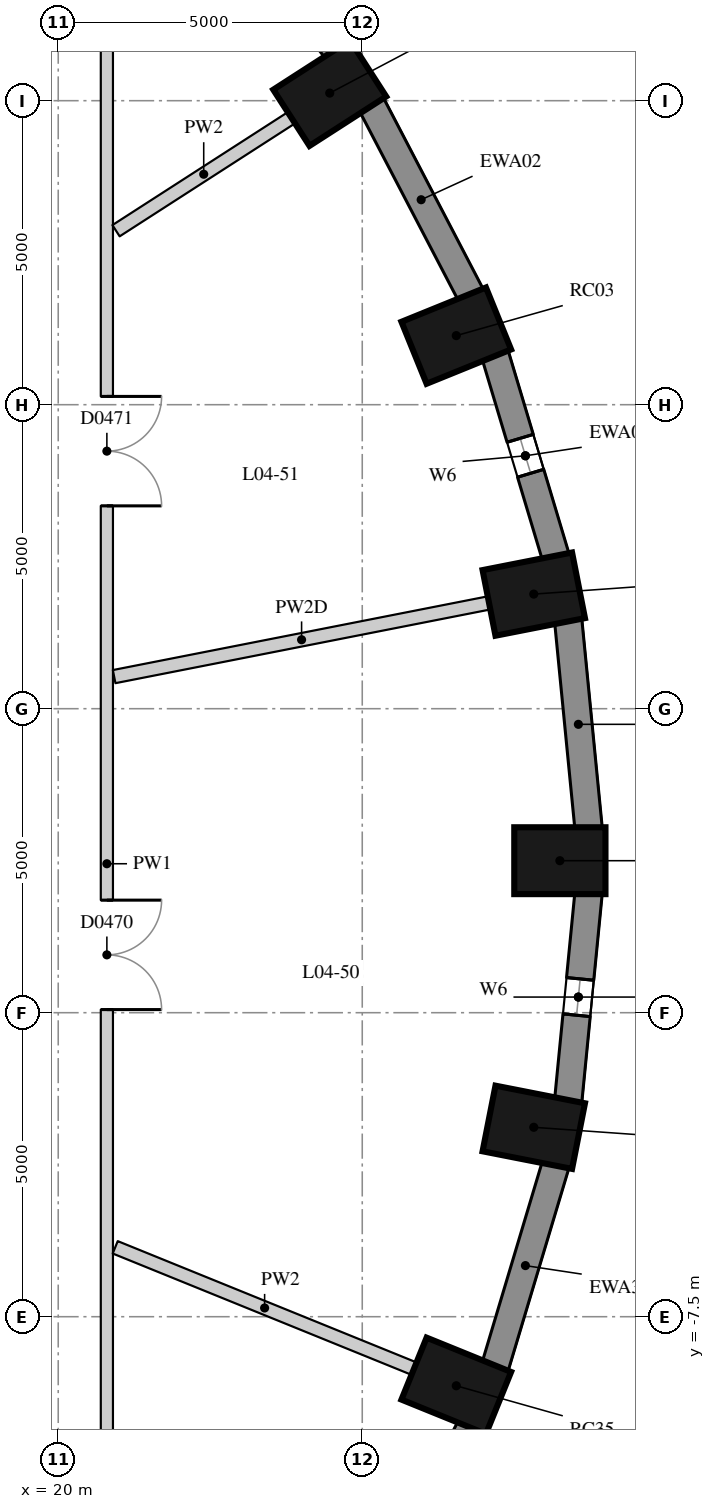
"""IFC4 building model, lengths in metres.
Left out: names, types, materials, properties, quantities, classifications, styles, units other than length and angle.
Written with IfcOpenShell. Run it as: python <this file> out.ifc"""

import sys

from ifc_helpers import new_model, si_unit, direction, frame, frame_2d, origin, origin_2d, place, context, subcontext, project, spatial, rectangle, extrude, element, fill, save


model = new_model("IFC4")
c1 = context("Model", 3, precision=1e-05, world=origin(), true_north=direction((0.0, 1.0)))
c2 = subcontext(c1, "Body", "Model", "MODEL_VIEW")
j1 = project(units=[si_unit("LENGTHUNIT", "METRE"), si_unit("PLANEANGLEUNIT", "RADIAN")], contexts=[c1])
p1 = place(None, origin())
s1 = spatial("IfcSite", under=j1, at=p1, CompositionType="ELEMENT")
p2 = place(p1, origin())
s2 = spatial("IfcBuilding", under=s1, at=p2, CompositionType="ELEMENT")
p3 = place(p2, frame((0.0, 0.0, 21.7)))
s3 = spatial("IfcBuildingStorey", under=s2, at=p3, CompositionType="ELEMENT", Elevation=21.7)
for number, where, z_axis, x_axis in (
    (1, (28.25, 0.0, 0.0), (0.0, 0.0, 1.0), (1.0, 0.0, 0.0)),
    (2, (27.821, 4.385, 0.0), (0.0, 0.0, 1.0), (0.981, 0.193, 0.0)),
    (3, (26.546, 8.636, 0.0), (0.0, 0.0, 1.0), (0.927, 0.376, 0.0)),
    (4, (24.465, 12.625, 0.0), (0.0, 0.0, 1.0), (0.841, 0.541, 0.0)),
    (5, (26.546, -8.636, 0.0), (0.0, 0.0, 1.0), (0.927, -0.376, 0.0)),
    (6, (27.821, -4.385, 0.0), (0.0, 0.0, 1.0), (0.981, -0.193, 0.0)),
):
    element("IfcColumn", number, at=place(p3, frame(where, z_axis=z_axis, x_axis=x_axis)), inside=s3, PredefinedType="COLUMN", context=c2, shape_type="SweptSolid", body=[
        extrude(rectangle(XDim=1.5, YDim=1.1, at=origin_2d()), origin(), (0.0, 0.0, 1.0), 3.3),
    ])
p4 = place(p3, frame((28.722, 0.53, 0.0), z_axis=(0.0, 0.0, 1.0), x_axis=(-0.097389581596, 0.995246336038, 0.0)))
e7 = element("IfcWall", 7, at=p4, inside=s3, PredefinedType="SOLIDWALL", context=c2, shape_type="SweptSolid", body=[
    extrude(rectangle(XDim=3.442, YDim=0.45, at=frame_2d((1.721, 0.0))), origin(), (0.0, 0.0, 1.0), 3.02),
])
p5 = place(p3, frame((28.182, 4.996, 0.0), z_axis=(0.0, 0.0, 1.0), x_axis=(-0.287064133733, 0.957911364963, 0.0)))
e8 = element("IfcWall", 8, at=p5, inside=s3, PredefinedType="SOLIDWALL", context=c2, shape_type="SweptSolid", body=[
    extrude(rectangle(XDim=3.473, YDim=0.45, at=frame_2d((1.737, 0.0))), origin(), (0.0, 0.0, 1.0), 3.02),
])
p6 = place(p5, frame((1.437, 0.0, 0.4)))
e9 = element("IfcOpeningElement", 9, at=p6, cuts=e8, PredefinedType="OPENING", context=c2, shape_type="SweptSolid", body=[
    extrude(rectangle(XDim=0.6, YDim=1.75, at=frame_2d((0.3, 0.875))), frame((0.0, 0.235, 0.0), z_axis=(0.0, -1.0, 0.0), x_axis=(1.0, 0.0, 0.0)), (0.0, 0.0, 1.0), 0.47),
])
p7 = place(p3, frame((26.786, 9.305, 0.0), z_axis=(0.0, 0.0, 1.0), x_axis=(-0.462492775226, 0.886623050041, 0.0)))
e10 = element("IfcWall", 10, at=p7, inside=s3, PredefinedType="SOLIDWALL", context=c2, shape_type="SweptSolid", body=[
    extrude(rectangle(XDim=3.532, YDim=0.45, at=frame_2d((1.766, 0.0))), origin(), (0.0, 0.0, 1.0), 3.02),
])
p8 = place(p3, frame((24.578, 13.328, 0.0), z_axis=(0.0, 0.0, 1.0), x_axis=(-0.616661975264, 0.787228053529, 0.0)))
e11 = element("IfcWall", 11, at=p8, inside=s3, PredefinedType="SOLIDWALL", context=c2, shape_type="SweptSolid", body=[
    extrude(rectangle(XDim=3.61, YDim=0.45, at=frame_2d((1.805, 0.0))), origin(), (0.0, 0.0, 1.0), 3.02),
])
p9 = place(p8, frame((1.505, 0.0, 0.4)))
e12 = element("IfcOpeningElement", 12, at=p9, cuts=e11, PredefinedType="OPENING", context=c2, shape_type="SweptSolid", body=[
    extrude(rectangle(XDim=0.6, YDim=1.75, at=frame_2d((0.3, 0.875))), frame((0.0, 0.235, 0.0), z_axis=(0.0, -1.0, 0.0), x_axis=(1.0, 0.0, 0.0)), (0.0, 0.0, 1.0), 0.47),
])
p10 = place(p3, frame((25.152, -12.437, 0.0), z_axis=(0.0, 0.0, 1.0), x_axis=(0.462492775226, 0.886623050041, 0.0)))
e13 = element("IfcWall", 13, at=p10, inside=s3, PredefinedType="SOLIDWALL", context=c2, shape_type="SweptSolid", body=[
    extrude(rectangle(XDim=3.532, YDim=0.45, at=frame_2d((1.766, 0.0))), origin(), (0.0, 0.0, 1.0), 3.02),
])
p11 = place(p10, frame((1.466, 0.0, 0.4)))
e14 = element("IfcOpeningElement", 14, at=p11, cuts=e13, PredefinedType="OPENING", context=c2, shape_type="SweptSolid", body=[
    extrude(rectangle(XDim=0.6, YDim=1.75, at=frame_2d((0.3, 0.875))), frame((0.0, 0.235, 0.0), z_axis=(0.0, -1.0, 0.0), x_axis=(1.0, 0.0, 0.0)), (0.0, 0.0, 1.0), 0.47),
])
p12 = place(p3, frame((27.185, -8.323, 0.0), z_axis=(0.0, 0.0, 1.0), x_axis=(0.287064133733, 0.957911364963, 0.0)))
e15 = element("IfcWall", 15, at=p12, inside=s3, PredefinedType="SOLIDWALL", context=c2, shape_type="SweptSolid", body=[
    extrude(rectangle(XDim=3.473, YDim=0.45, at=frame_2d((1.737, 0.0))), origin(), (0.0, 0.0, 1.0), 3.02),
])
p13 = place(p3, frame((28.387, -3.956, 0.0), z_axis=(0.0, 0.0, 1.0), x_axis=(0.097389581596, 0.995246336038, 0.0)))
e16 = element("IfcWall", 16, at=p13, inside=s3, PredefinedType="SOLIDWALL", context=c2, shape_type="SweptSolid", body=[
    extrude(rectangle(XDim=3.442, YDim=0.45, at=frame_2d((1.721, 0.0))), origin(), (0.0, 0.0, 1.0), 3.02),
])
p14 = place(p13, frame((1.421, 0.0, 0.4)))
e17 = element("IfcOpeningElement", 17, at=p14, cuts=e16, PredefinedType="OPENING", context=c2, shape_type="SweptSolid", body=[
    extrude(rectangle(XDim=0.6, YDim=1.75, at=frame_2d((0.3, 0.875))), frame((0.0, 0.235, 0.0), z_axis=(0.0, -1.0, 0.0), x_axis=(1.0, 0.0, 0.0)), (0.0, 0.0, 1.0), 0.47),
])
p15 = place(p3, frame((20.8, 13.5, 0.0), z_axis=(0.0, 0.0, 1.0), x_axis=(0.0, -1.0, 0.0)))
e18 = element("IfcWall", 18, at=p15, inside=s3, PredefinedType="PARTITIONING", context=c2, shape_type="SweptSolid", body=[
    extrude(rectangle(XDim=27.1, YDim=0.2, at=frame_2d((13.55, 0.0))), origin(), (0.0, 0.0, 1.0), 3.02),
])
p16 = place(p15, frame((14.149, 0.0, 0.0)))
e19 = element("IfcOpeningElement", 19, at=p16, cuts=e18, PredefinedType="OPENING", context=c2, shape_type="SweptSolid", body=[
    extrude(rectangle(XDim=1.8, YDim=2.1, at=frame_2d((0.9, 1.05))), frame((0.0, 0.11, 0.0), z_axis=(0.0, -1.0, 0.0), x_axis=(1.0, 0.0, 0.0)), (0.0, 0.0, 1.0), 0.22),
])
p17 = place(p15, frame((5.864, 0.0, 0.0)))
e20 = element("IfcOpeningElement", 20, at=p17, cuts=e18, PredefinedType="OPENING", context=c2, shape_type="SweptSolid", body=[
    extrude(rectangle(XDim=1.8, YDim=2.1, at=frame_2d((0.9, 1.05))), frame((0.0, 0.11, 0.0), z_axis=(0.0, -1.0, 0.0), x_axis=(1.0, 0.0, 0.0)), (0.0, 0.0, 1.0), 0.22),
])
p18 = place(p3, frame((27.085, 4.24, 0.0), z_axis=(0.0, 0.0, 1.0), x_axis=(-0.981207724218, -0.192954403772, 0.0)))
e21 = element("IfcWall", 21, at=p18, inside=s3, PredefinedType="PARTITIONING", context=c2, shape_type="SweptSolid", body=[
    extrude(rectangle(XDim=6.283, YDim=0.22, at=frame_2d((3.142, 0.0))), origin(), (0.0, 0.0, 1.0), 2.47),
])
p19 = place(p3, frame((23.835, 12.219, 0.0), z_axis=(0.0, 0.0, 1.0), x_axis=(-0.840694872373, -0.541509124176, 0.0)))
e22 = element("IfcWall", 22, at=p19, inside=s3, PredefinedType="PARTITIONING", context=c2, shape_type="SweptSolid", body=[
    extrude(rectangle(XDim=3.43, YDim=0.22, at=frame_2d((1.715, 0.0))), origin(), (0.0, 0.0, 1.0), 3.02),
])
p20 = place(p3, frame((25.851, -8.354, 0.0), z_axis=(0.0, 0.0, 1.0), x_axis=(-0.926546814299, 0.376179479653, 0.0)))
e23 = element("IfcWall", 23, at=p20, inside=s3, PredefinedType="PARTITIONING", context=c2, shape_type="SweptSolid", body=[
    extrude(rectangle(XDim=5.304, YDim=0.22, at=frame_2d((2.652, 0.0))), origin(), (0.0, 0.0, 1.0), 3.02),
])
p21 = place(p6, origin())
e24 = element("IfcWindow", 24, at=p21, inside=s3, PartitioningType="SINGLE_PANEL", PredefinedType="WINDOW", context=c2, shape_type="SweptSolid", body=[
    extrude(rectangle(XDim=0.6, YDim=1.75, at=frame_2d((0.3, 0.875))), frame((0.0, 0.035, 0.0), z_axis=(0.0, -1.0, 0.0), x_axis=(1.0, 0.0, 0.0)), (0.0, 0.0, 1.0), 0.06),
])
fill(e9, e24)
p22 = place(p14, origin())
e25 = element("IfcWindow", 25, at=p22, inside=s3, PartitioningType="SINGLE_PANEL", PredefinedType="WINDOW", context=c2, shape_type="SweptSolid", body=[
    extrude(rectangle(XDim=0.6, YDim=1.75, at=frame_2d((0.3, 0.875))), frame((0.0, 0.035, 0.0), z_axis=(0.0, -1.0, 0.0), x_axis=(1.0, 0.0, 0.0)), (0.0, 0.0, 1.0), 0.06),
])
fill(e17, e25)
p23 = place(p16, origin())
e26 = element("IfcDoor", 26, at=p23, inside=s3, OperationType="DOUBLE_DOOR_SINGLE_SWING", PredefinedType="DOOR", context=c2, shape_type="SweptSolid", body=[
    extrude(rectangle(XDim=1.8, YDim=2.1, at=frame_2d((0.9, 1.05))), frame((0.0, 0.025, 0.0), z_axis=(0.0, -1.0, 0.0), x_axis=(1.0, 0.0, 0.0)), (0.0, 0.0, 1.0), 0.05),
])
fill(e19, e26)
p24 = place(p17, origin())
e27 = element("IfcDoor", 27, at=p24, inside=s3, OperationType="DOUBLE_DOOR_SINGLE_SWING", PredefinedType="DOOR", context=c2, shape_type="SweptSolid", body=[
    extrude(rectangle(XDim=1.8, YDim=2.1, at=frame_2d((0.9, 1.05))), frame((0.0, 0.025, 0.0), z_axis=(0.0, -1.0, 0.0), x_axis=(1.0, 0.0, 0.0)), (0.0, 0.0, 1.0), 0.05),
])
fill(e20, e27)
save(model, sys.argv[1])
